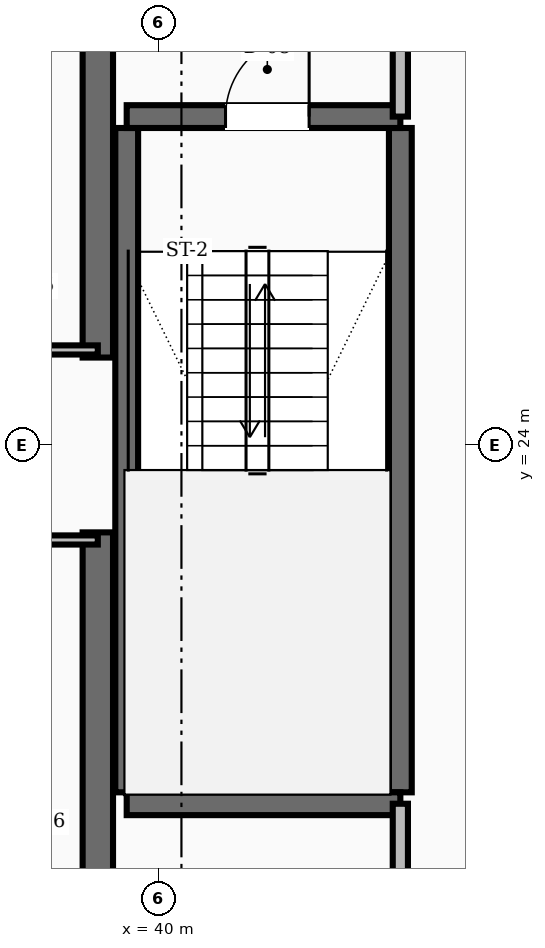
"""IFC4 building model, lengths in metres.
Left out: names, types, materials, properties, quantities, classifications, styles, units other than length and angle.
Written with IfcOpenShell. Run it as: python <this file> out.ifc"""

import sys

from ifc_helpers import new_model, si_unit, direction, frame, frame_2d, origin, place, context, subcontext, project, spatial, rectangle, extrude, element, fill, save


model = new_model("IFC4")
c1 = context("Model", 3, precision=1e-05, world=origin(), true_north=direction((0.0, 1.0)))
c2 = subcontext(c1, "Body", "Model", "MODEL_VIEW")
j1 = project(units=[si_unit("LENGTHUNIT", "METRE"), si_unit("PLANEANGLEUNIT", "RADIAN")], contexts=[c1])
p1 = place(None, origin())
s1 = spatial("IfcSite", under=j1, at=p1, CompositionType="ELEMENT")
p2 = place(p1, origin())
s2 = spatial("IfcBuilding", under=s1, at=p2, CompositionType="ELEMENT")
p3 = place(p2, frame((0.0, 0.0, 34.0)))
s3 = spatial("IfcBuildingStorey", under=s2, at=p3, CompositionType="ELEMENT", Elevation=34.0)
for number, where, z_axis, x_axis in (
    (1, (39.2, 16.55, 0.0), (0.0, 0.0, 1.0), (0.0, 1.0, 0.0)),
    (2, (39.2, 25.15, 0.0), (0.0, 0.0, 1.0), (0.0, 1.0, 0.0)),
):
    element("IfcWall", number, at=place(p3, frame(where, z_axis=z_axis, x_axis=x_axis)), inside=s3, PredefinedType="SHEAR", context=c2, shape_type="SweptSolid", body=[
        extrude(rectangle(XDim=6.3, YDim=0.4, at=frame_2d((3.15, 0.0))), origin(), (0.0, 0.0, 1.0), 3.6),
    ])
for number, where, z_axis, x_axis in (
    (3, (43.18, 19.43, 0.0), (0.0, 0.0, 1.0), (0.0, 1.0, 0.0)),
    (4, (39.58, 19.43, 0.0), (0.0, 0.0, 1.0), (0.0, 1.0, 0.0)),
):
    element("IfcWall", number, at=place(p3, frame(where, z_axis=z_axis, x_axis=x_axis)), inside=s3, PredefinedType="SHEAR", context=c2, shape_type="SweptSolid", body=[
        extrude(rectangle(XDim=8.74, YDim=0.3, at=frame_2d((4.37, 0.0))), origin(), (0.0, 0.0, 1.0), 3.6),
    ])
p4 = place(p3, frame((39.58, 19.28, 0.0), z_axis=(0.0, 0.0, 1.0), x_axis=(1.0, 0.0, 0.0)))
e5 = element("IfcWall", 5, at=p4, inside=s3, PredefinedType="SHEAR", context=c2, shape_type="SweptSolid", body=[
    extrude(rectangle(XDim=3.6, YDim=0.3, at=frame_2d((1.8, 0.0))), origin(), (0.0, 0.0, 1.0), 3.6),
])
p5 = place(p3, frame((39.58, 28.32, 0.0), z_axis=(0.0, 0.0, 1.0), x_axis=(1.0, 0.0, 0.0)))
e6 = element("IfcWall", 6, at=p5, inside=s3, PredefinedType="SHEAR", context=c2, shape_type="SweptSolid", body=[
    extrude(rectangle(XDim=3.6, YDim=0.3, at=frame_2d((1.8, 0.0))), origin(), (0.0, 0.0, 1.0), 3.6),
])
p6 = place(p5, frame((1.3, 0.0, 0.0)))
e7 = element("IfcOpeningElement", 7, at=p6, cuts=e6, PredefinedType="OPENING", context=c2, shape_type="SweptSolid", body=[
    extrude(rectangle(XDim=1.1, YDim=2.1, at=frame_2d((0.55, 1.05))), frame((0.0, 0.16, 0.0), z_axis=(0.0, -1.0, 0.0), x_axis=(1.0, 0.0, 0.0)), (0.0, 0.0, 1.0), 0.32),
])
p7 = place(p3, frame((43.18, 28.32, 0.0), z_axis=(0.0, 0.0, 1.0), x_axis=(0.0, 1.0, 0.0)))
e8 = element("IfcWall", 8, at=p7, inside=s3, PredefinedType="SOLIDWALL", context=c2, shape_type="SweptSolid", body=[
    extrude(rectangle(XDim=3.13, YDim=0.2, at=frame_2d((1.565, 0.0))), origin(), (0.0, 0.0, 1.0), 2.61),
])
p8 = place(p7, frame((1.015, 0.0, 0.0)))
e9 = element("IfcOpeningElement", 9, at=p8, cuts=e8, PredefinedType="OPENING", context=c2, shape_type="SweptSolid", body=[
    extrude(rectangle(XDim=1.1, YDim=2.1, at=frame_2d((0.55, 1.05))), frame((0.0, 0.11, 0.0), z_axis=(0.0, -1.0, 0.0), x_axis=(1.0, 0.0, 0.0)), (0.0, 0.0, 1.0), 0.22),
])
p9 = place(p3, frame((43.18, 16.55, 0.0), z_axis=(0.0, 0.0, 1.0), x_axis=(0.0, 1.0, 0.0)))
e10 = element("IfcWall", 10, at=p9, inside=s3, PredefinedType="SOLIDWALL", context=c2, shape_type="SweptSolid", body=[
    extrude(rectangle(XDim=2.73, YDim=0.2, at=frame_2d((1.365, 0.0))), origin(), (0.0, 0.0, 1.0), 2.61),
])
p10 = place(p9, frame((0.89, 0.0, 0.0)))
e11 = element("IfcOpeningElement", 11, at=p10, cuts=e10, PredefinedType="OPENING", context=c2, shape_type="SweptSolid", body=[
    extrude(rectangle(XDim=0.95, YDim=2.1, at=frame_2d((0.475, 1.05))), frame((0.0, 0.11, 0.0), z_axis=(0.0, -1.0, 0.0), x_axis=(1.0, 0.0, 0.0)), (0.0, 0.0, 1.0), 0.22),
])
for number, where, z_axis, x_axis in (
    (12, (37.4, 25.25, 0.0), (0.0, 0.0, 1.0), (1.0, 0.0, 0.0)),
    (13, (37.4, 22.75, 0.0), (0.0, 0.0, 1.0), (1.0, 0.0, 0.0)),
):
    element("IfcWall", number, at=place(p3, frame(where, z_axis=z_axis, x_axis=x_axis)), inside=s3, PredefinedType="PARTITIONING", context=c2, shape_type="SweptSolid", body=[
        extrude(rectangle(XDim=1.8, YDim=0.12, at=frame_2d((0.9, 0.0))), origin(), (0.0, 0.0, 1.0), 2.61),
    ])
p11 = place(p6, origin())
e14 = element("IfcDoor", 14, at=p11, inside=s3, OperationType="SINGLE_SWING_RIGHT", PredefinedType="DOOR", context=c2, shape_type="SweptSolid", body=[
    extrude(rectangle(XDim=1.1, YDim=2.1, at=frame_2d((0.55, 1.05))), frame((0.0, 0.025, 0.0), z_axis=(0.0, -1.0, 0.0), x_axis=(1.0, 0.0, 0.0)), (0.0, 0.0, 1.0), 0.05),
])
fill(e7, e14)
save(model, sys.argv[1])
